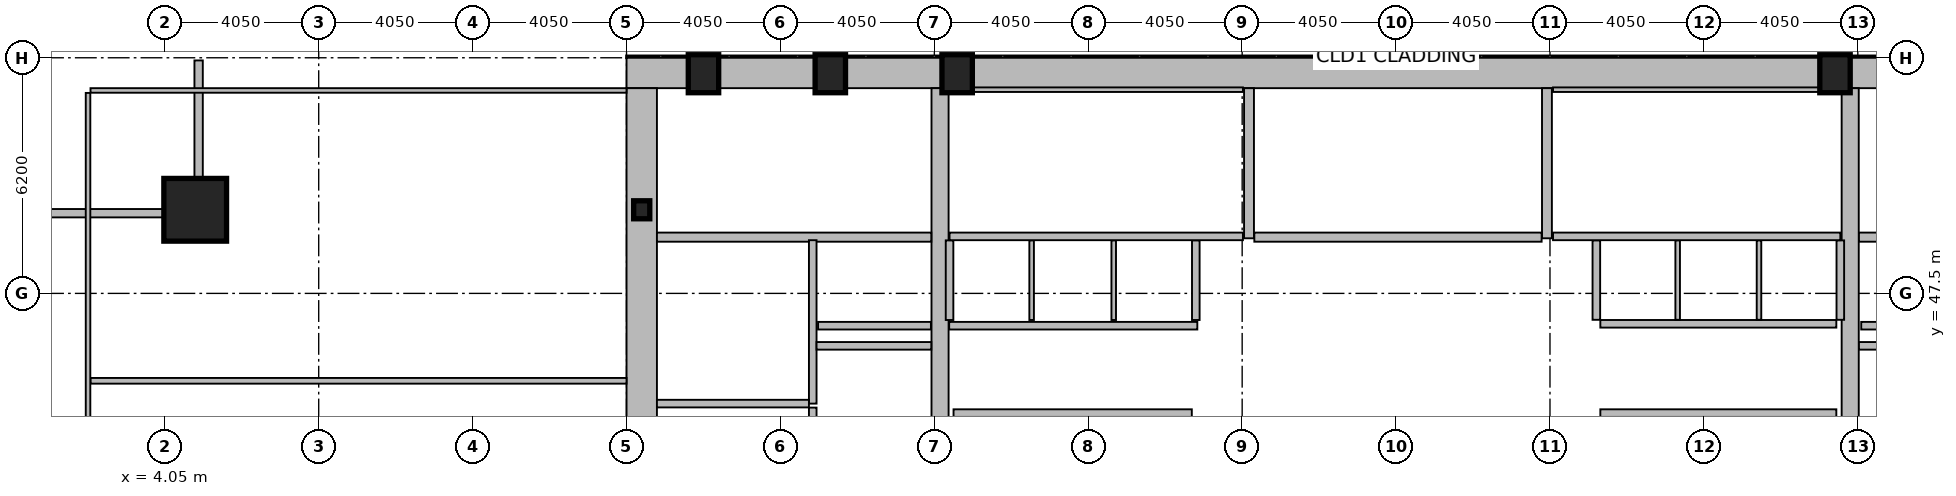
"""IFC4 building model, lengths in metres.
Left out: names, types, materials, properties, quantities, classifications, styles, units other than length and angle.
Written with IfcOpenShell. Run it as: python <this file> out.ifc"""

import sys

from ifc_helpers import new_model, si_unit, direction, frame, frame_2d, origin, origin_2d, place, context, subcontext, project, spatial, rectangle, hollow_rectangle, i_section, extrude, element, fill, save


model = new_model("IFC4")
c1 = context("Model", 3, precision=1e-05, world=origin(), true_north=direction((0.0, 1.0)))
c2 = subcontext(c1, "Body", "Model", "MODEL_VIEW")
j1 = project(units=[si_unit("LENGTHUNIT", "METRE"), si_unit("PLANEANGLEUNIT", "RADIAN")], contexts=[c1])
p1 = place(None, origin())
s1 = spatial("IfcSite", under=j1, at=p1, CompositionType="ELEMENT")
p2 = place(p1, origin())
s2 = spatial("IfcBuilding", under=s1, at=p2, CompositionType="ELEMENT")
p3 = place(p2, frame((0.0, 0.0, 61.8)))
s3 = spatial("IfcBuildingStorey", under=s2, at=p3, CompositionType="ELEMENT", Elevation=61.8)
p4 = place(p3, frame((16.2, 53.3, 0.0), z_axis=(0.0, 0.0, 1.0), x_axis=(1.0, 0.0, 0.0)))
e1 = element("IfcWall", 1, at=p4, inside=s3, PredefinedType="SHEAR", context=c2, shape_type="SweptSolid", body=[
    extrude(rectangle(XDim=40.5, YDim=0.8, at=frame_2d((20.25, 0.0))), origin(), (0.0, 0.0, 1.0), 3.82),
])
p5 = place(p3, frame((16.6, 42.1, 0.0), z_axis=(0.0, 0.0, 1.0), x_axis=(0.0, 1.0, 0.0)))
e2 = element("IfcWall", 2, at=p5, inside=s3, PredefinedType="SHEAR", context=c2, shape_type="SweptSolid", body=[
    extrude(rectangle(XDim=10.8, YDim=0.8, at=frame_2d((5.4, 0.0))), origin(), (0.0, 0.0, 1.0), 3.82),
])
for number, where, z_axis, x_axis in (
    (3, (24.45, 42.1, 0.0), (0.0, 0.0, 1.0), (0.0, 1.0, 0.0)),
    (4, (48.4, 42.1, 0.0), (0.0, 0.0, 1.0), (0.0, 1.0, 0.0)),
):
    element("IfcWall", number, at=place(p3, frame(where, z_axis=z_axis, x_axis=x_axis)), inside=s3, PredefinedType="SHEAR", context=c2, shape_type="SweptSolid", body=[
        extrude(rectangle(XDim=10.8, YDim=0.45, at=frame_2d((5.4, 0.0))), origin(), (0.0, 0.0, 1.0), 3.82),
    ])
for number, where, z_axis, x_axis in (
    (5, (32.58, 48.95, 0.0), (0.0, 0.0, 1.0), (0.0, 1.0, 0.0)),
    (6, (40.42, 48.95, 0.0), (0.0, 0.0, 1.0), (0.0, 1.0, 0.0)),
):
    element("IfcWall", number, at=place(p3, frame(where, z_axis=z_axis, x_axis=x_axis)), inside=s3, PredefinedType="SHEAR", context=c2, shape_type="SweptSolid", body=[
        extrude(rectangle(XDim=3.95, YDim=0.26, at=frame_2d((1.975, 0.0))), origin(), (0.0, 0.0, 1.0), 3.82),
    ])
p6 = place(p3, frame((17.0, 48.98, 0.0), z_axis=(0.0, 0.0, 1.0), x_axis=(1.0, 0.0, 0.0)))
e7 = element("IfcWall", 7, at=p6, inside=s3, PredefinedType="SHEAR", context=c2, shape_type="SweptSolid", body=[
    extrude(rectangle(XDim=7.22, YDim=0.24, at=frame_2d((3.61, 0.0))), origin(), (0.0, 0.0, 1.0), 3.82),
])
p7 = place(p6, frame((0.22, 0.0, 0.0)))
e8 = element("IfcOpeningElement", 8, at=p7, cuts=e7, PredefinedType="OPENING", context=c2, shape_type="SweptSolid", body=[
    extrude(rectangle(XDim=1.05, YDim=2.15, at=frame_2d((0.525, 1.075))), frame((0.0, 0.13, 0.0), z_axis=(0.0, -1.0, 0.0), x_axis=(1.0, 0.0, 0.0)), (0.0, 0.0, 1.0), 0.26),
])
p8 = place(p3, frame((48.63, 48.98, 0.0), z_axis=(0.0, 0.0, 1.0), x_axis=(1.0, 0.0, 0.0)))
e9 = element("IfcWall", 9, at=p8, inside=s3, PredefinedType="SHEAR", context=c2, shape_type="SweptSolid", body=[
    extrude(rectangle(XDim=7.27, YDim=0.24, at=frame_2d((3.635, 0.0))), origin(), (0.0, 0.0, 1.0), 3.82),
])
p9 = place(p8, frame((6.0, 0.0, 0.0)))
e10 = element("IfcOpeningElement", 10, at=p9, cuts=e9, PredefinedType="OPENING", context=c2, shape_type="SweptSolid", body=[
    extrude(rectangle(XDim=1.05, YDim=2.15, at=frame_2d((0.525, 1.075))), frame((0.0, 0.13, 0.0), z_axis=(0.0, -1.0, 0.0), x_axis=(1.0, 0.0, 0.0)), (0.0, 0.0, 1.0), 0.26),
])
p10 = place(p3, frame((32.72, 48.98, 0.0), z_axis=(0.0, 0.0, 1.0), x_axis=(1.0, 0.0, 0.0)))
e11 = element("IfcWall", 11, at=p10, inside=s3, PredefinedType="SHEAR", context=c2, shape_type="SweptSolid", body=[
    extrude(rectangle(XDim=7.56, YDim=0.24, at=frame_2d((3.78, 0.0))), origin(), (0.0, 0.0, 1.0), 3.82),
])
p11 = place(p10, frame((0.22, 0.0, 0.0)))
e12 = element("IfcOpeningElement", 12, at=p11, cuts=e11, PredefinedType="OPENING", context=c2, shape_type="SweptSolid", body=[
    extrude(rectangle(XDim=1.05, YDim=2.15, at=frame_2d((0.525, 1.075))), frame((0.0, 0.13, 0.0), z_axis=(0.0, -1.0, 0.0), x_axis=(1.0, 0.0, 0.0)), (0.0, 0.0, 1.0), 0.26),
])
p12 = place(p3, frame((4.85, 49.7, 0.0), z_axis=(0.0, 0.0, 1.0), x_axis=(1.0, 0.0, 0.0)))
e13 = element("IfcColumn", 13, at=p12, inside=s3, PredefinedType="COLUMN", context=c2, shape_type="SweptSolid", body=[
    extrude(hollow_rectangle(XDim=1.65, YDim=1.65, WallThickness=0.075, at=origin_2d()), origin(), (0.0, 0.0, 1.0), 4.0),
])
for number, where, z_axis, x_axis in (
    (14, (18.225, 53.28, 0.0), (0.0, 0.0, 1.0), (1.0, 0.0, 0.0)),
    (15, (21.562, 53.28, 0.0), (0.0, 0.0, 1.0), (1.0, 0.0, 0.0)),
    (16, (24.9, 53.28, 0.0), (0.0, 0.0, 1.0), (1.0, 0.0, 0.0)),
    (17, (48.0, 53.28, 0.0), (0.0, 0.0, 1.0), (1.0, 0.0, 0.0)),
):
    element("IfcColumn", number, at=place(p3, frame(where, z_axis=z_axis, x_axis=x_axis)), inside=s3, PredefinedType="COLUMN", context=c2, shape_type="SweptSolid", body=[
        extrude(hollow_rectangle(XDim=0.8, YDim=1.0, WallThickness=0.055, at=origin_2d()), origin(), (0.0, 0.0, 1.0), 4.0),
    ])
p13 = place(p3, frame((16.6, 49.7, 0.0), z_axis=(0.0, 0.0, 1.0), x_axis=(1.0, 0.0, 0.0)))
e18 = element("IfcColumn", 18, at=p13, inside=s3, PredefinedType="COLUMN", context=c2, shape_type="SweptSolid", body=[
    extrude(i_section(OverallWidth=0.424, OverallDepth=0.474, WebThickness=0.048, FlangeThickness=0.077, at=origin_2d()), origin(), (0.0, 0.0, 1.0), 4.0),
])
p14 = place(p3, frame((0.83, 49.61, 0.0), z_axis=(0.0, 0.0, 1.0), x_axis=(1.0, 0.0, 0.0)))
e19 = element("IfcWall", 19, at=p14, inside=s3, PredefinedType="SOLIDWALL", context=c2, shape_type="SweptSolid", body=[
    extrude(rectangle(XDim=4.22, YDim=0.22, at=frame_2d((2.11, 0.0))), origin(), (0.0, 0.0, 1.0), 3.16),
])
p15 = place(p3, frame((4.94, 49.72, 0.0), z_axis=(0.0, 0.0, 1.0), x_axis=(0.0, 1.0, 0.0)))
e20 = element("IfcWall", 20, at=p15, inside=s3, PredefinedType="SOLIDWALL", context=c2, shape_type="SweptSolid", body=[
    extrude(rectangle(XDim=3.91, YDim=0.22, at=frame_2d((1.955, 0.0))), origin(), (0.0, 0.0, 1.0), 3.16),
])
p16 = place(p3, frame((51.61, 46.65, 0.0), z_axis=(0.0, 0.0, 1.0), x_axis=(-1.0, 0.0, 0.0)))
e21 = element("IfcWall", 21, at=p16, inside=s3, PredefinedType="PARTITIONING", context=c2, shape_type="SweptSolid", body=[
    extrude(rectangle(XDim=2.92, YDim=0.2, at=frame_2d((1.46, 0.0))), origin(), (0.0, 0.0, 1.0), 3.82),
])
p17 = place(p16, frame((0.86, 0.0, 0.0)))
e22 = element("IfcOpeningElement", 22, at=p17, cuts=e21, PredefinedType="OPENING", context=c2, shape_type="SweptSolid", body=[
    extrude(rectangle(XDim=1.2, YDim=2.18, at=frame_2d((0.6, 1.09))), frame((0.0, 0.11, 0.0), z_axis=(0.0, -1.0, 0.0), x_axis=(1.0, 0.0, 0.0)), (0.0, 0.0, 1.0), 0.22),
])
p18 = place(p3, frame((24.21, 46.65, 0.0), z_axis=(0.0, 0.0, 1.0), x_axis=(-1.0, 0.0, 0.0)))
e23 = element("IfcWall", 23, at=p18, inside=s3, PredefinedType="PARTITIONING", context=c2, shape_type="SweptSolid", body=[
    extrude(rectangle(XDim=2.97, YDim=0.2, at=frame_2d((1.485, 0.0))), origin(), (0.0, 0.0, 1.0), 3.82),
])
p19 = place(p18, frame((0.91, 0.0, 0.0)))
e24 = element("IfcOpeningElement", 24, at=p19, cuts=e23, PredefinedType="OPENING", context=c2, shape_type="SweptSolid", body=[
    extrude(rectangle(XDim=1.2, YDim=2.18, at=frame_2d((0.6, 1.09))), frame((0.0, 0.11, 0.0), z_axis=(0.0, -1.0, 0.0), x_axis=(1.0, 0.0, 0.0)), (0.0, 0.0, 1.0), 0.22),
])
p20 = place(p3, frame((31.22, 46.65, 0.0), z_axis=(0.0, 0.0, 1.0), x_axis=(-1.0, 0.0, 0.0)))
e25 = element("IfcWall", 25, at=p20, inside=s3, PredefinedType="PARTITIONING", context=c2, shape_type="SweptSolid", body=[
    extrude(rectangle(XDim=6.53, YDim=0.2, at=frame_2d((3.265, 0.0))), origin(), (0.0, 0.0, 1.0), 3.82),
])
p21 = place(p20, frame((4.9, 0.0, 0.0)))
e26 = element("IfcOpeningElement", 26, at=p21, cuts=e25, PredefinedType="OPENING", context=c2, shape_type="SweptSolid", body=[
    extrude(rectangle(XDim=1.1, YDim=2.18, at=frame_2d((0.55, 1.09))), frame((0.0, 0.11, 0.0), z_axis=(0.0, -1.0, 0.0), x_axis=(1.0, 0.0, 0.0)), (0.0, 0.0, 1.0), 0.22),
])
p22 = place(p20, frame((2.74, 0.0, 0.0)))
e27 = element("IfcOpeningElement", 27, at=p22, cuts=e25, PredefinedType="OPENING", context=c2, shape_type="SweptSolid", body=[
    extrude(rectangle(XDim=1.1, YDim=2.18, at=frame_2d((0.55, 1.09))), frame((0.0, 0.11, 0.0), z_axis=(0.0, -1.0, 0.0), x_axis=(1.0, 0.0, 0.0)), (0.0, 0.0, 1.0), 0.22),
])
p23 = place(p20, frame((0.58, 0.0, 0.0)))
e28 = element("IfcOpeningElement", 28, at=p23, cuts=e25, PredefinedType="OPENING", context=c2, shape_type="SweptSolid", body=[
    extrude(rectangle(XDim=1.1, YDim=2.18, at=frame_2d((0.55, 1.09))), frame((0.0, 0.11, 0.0), z_axis=(0.0, -1.0, 0.0), x_axis=(1.0, 0.0, 0.0)), (0.0, 0.0, 1.0), 0.22),
])
p24 = place(p3, frame((21.1, 44.6, 0.0), z_axis=(0.0, 0.0, 1.0), x_axis=(0.0, 1.0, 0.0)))
e29 = element("IfcWall", 29, at=p24, inside=s3, PredefinedType="PARTITIONING", context=c2, shape_type="SweptSolid", body=[
    extrude(rectangle(XDim=4.3, YDim=0.2, at=frame_2d((2.15, 0.0))), origin(), (0.0, 0.0, 1.0), 3.82),
])
p25 = place(p3, frame((17.0, 44.6, 0.0), z_axis=(0.0, 0.0, 1.0), x_axis=(1.0, 0.0, 0.0)))
e30 = element("IfcWall", 30, at=p25, inside=s3, PredefinedType="PARTITIONING", context=c2, shape_type="SweptSolid", body=[
    extrude(rectangle(XDim=4.0, YDim=0.2, at=frame_2d((2.0, 0.0))), origin(), (0.0, 0.0, 1.0), 3.82),
])
p26 = place(p25, frame((1.25, 0.0, 0.0)))
e31 = element("IfcOpeningElement", 31, at=p26, cuts=e30, PredefinedType="OPENING", context=c2, shape_type="SweptSolid", body=[
    extrude(rectangle(XDim=1.05, YDim=2.15, at=frame_2d((0.525, 1.075))), frame((0.0, 0.11, 0.0), z_axis=(0.0, -1.0, 0.0), x_axis=(1.0, 0.0, 0.0)), (0.0, 0.0, 1.0), 0.22),
])
p27 = place(p3, frame((21.2, 46.12, 0.0), z_axis=(0.0, 0.0, 1.0), x_axis=(1.0, 0.0, 0.0)))
e32 = element("IfcWall", 32, at=p27, inside=s3, PredefinedType="PARTITIONING", context=c2, shape_type="SweptSolid", body=[
    extrude(rectangle(XDim=3.02, YDim=0.2, at=frame_2d((1.51, 0.0))), origin(), (0.0, 0.0, 1.0), 3.82),
])
p28 = place(p3, frame((21.1, 42.1, 0.0), z_axis=(0.0, 0.0, 1.0), x_axis=(0.0, 1.0, 0.0)))
e33 = element("IfcWall", 33, at=p28, inside=s3, PredefinedType="PARTITIONING", context=c2, shape_type="SweptSolid", body=[
    extrude(rectangle(XDim=2.395, YDim=0.2, at=frame_2d((1.198, 0.0))), origin(), (0.0, 0.0, 1.0), 3.82),
])
p29 = place(p28, frame((0.38, 0.0, 0.0)))
e34 = element("IfcOpeningElement", 34, at=p29, cuts=e33, PredefinedType="OPENING", context=c2, shape_type="SweptSolid", body=[
    extrude(rectangle(XDim=1.05, YDim=2.15, at=frame_2d((0.525, 1.075))), frame((0.0, 0.11, 0.0), z_axis=(0.0, -1.0, 0.0), x_axis=(1.0, 0.0, 0.0)), (0.0, 0.0, 1.0), 0.22),
])
p30 = place(p3, frame((48.63, 46.12, 0.0), z_axis=(0.0, 0.0, 1.0), x_axis=(1.0, 0.0, 0.0)))
e35 = element("IfcWall", 35, at=p30, inside=s3, PredefinedType="PARTITIONING", context=c2, shape_type="SweptSolid", body=[
    extrude(rectangle(XDim=3.07, YDim=0.2, at=frame_2d((1.535, 0.0))), origin(), (0.0, 0.0, 1.0), 3.82),
])
for number, where, z_axis, x_axis in (
    (36, (24.7, 46.8, 0.0), (0.0, 0.0, 1.0), (0.0, 1.0, 0.0)),
    (37, (31.18, 46.8, 0.0), (0.0, 0.0, 1.0), (0.0, 1.0, 0.0)),
):
    element("IfcWall", number, at=place(p3, frame(where, z_axis=z_axis, x_axis=x_axis)), inside=s3, PredefinedType="PARTITIONING", context=c2, shape_type="SweptSolid", body=[
        extrude(rectangle(XDim=2.095, YDim=0.2, at=frame_2d((1.047, 0.0))), origin(), (0.0, 0.0, 1.0), 3.82),
    ])
for number, where, z_axis, x_axis in (
    (38, (26.86, 46.8, 0.0), (0.0, 0.0, 1.0), (0.0, 1.0, 0.0)),
    (39, (29.02, 46.8, 0.0), (0.0, 0.0, 1.0), (0.0, 1.0, 0.0)),
):
    element("IfcWall", number, at=place(p3, frame(where, z_axis=z_axis, x_axis=x_axis)), inside=s3, PredefinedType="PARTITIONING", context=c2, shape_type="SweptSolid", body=[
        extrude(rectangle(XDim=2.095, YDim=0.12, at=frame_2d((1.047, 0.0))), origin(), (0.0, 0.0, 1.0), 3.82),
    ])
p31 = place(p3, frame((24.805, 44.35, 0.0), z_axis=(0.0, 0.0, 1.0), x_axis=(1.0, 0.0, 0.0)))
e40 = element("IfcWall", 40, at=p31, inside=s3, PredefinedType="PARTITIONING", context=c2, shape_type="SweptSolid", body=[
    extrude(rectangle(XDim=6.27, YDim=0.2, at=frame_2d((3.135, 0.0))), origin(), (0.0, 0.0, 1.0), 3.82),
])
p32 = place(p3, frame((41.825, 46.7, 0.0), z_axis=(0.0, 0.0, 1.0), x_axis=(1.0, 0.0, 0.0)))
e41 = element("IfcWall", 41, at=p32, inside=s3, PredefinedType="PARTITIONING", context=c2, shape_type="SweptSolid", body=[
    extrude(rectangle(XDim=6.21, YDim=0.2, at=frame_2d((3.105, 0.0))), origin(), (0.0, 0.0, 1.0), 3.82),
])
for number, where, z_axis, x_axis in (
    (42, (41.72, 46.805, 0.0), (0.0, 0.0, 1.0), (0.0, 1.0, 0.0)),
    (43, (48.14, 46.805, 0.0), (0.0, 0.0, 1.0), (0.0, 1.0, 0.0)),
):
    element("IfcWall", number, at=place(p3, frame(where, z_axis=z_axis, x_axis=x_axis)), inside=s3, PredefinedType="PARTITIONING", context=c2, shape_type="SweptSolid", body=[
        extrude(rectangle(XDim=2.09, YDim=0.2, at=frame_2d((1.045, 0.0))), origin(), (0.0, 0.0, 1.0), 3.82),
    ])
for number, where, z_axis, x_axis in (
    (44, (43.86, 46.805, 0.0), (0.0, 0.0, 1.0), (0.0, 1.0, 0.0)),
    (45, (46.0, 46.805, 0.0), (0.0, 0.0, 1.0), (0.0, 1.0, 0.0)),
):
    element("IfcWall", number, at=place(p3, frame(where, z_axis=z_axis, x_axis=x_axis)), inside=s3, PredefinedType="PARTITIONING", context=c2, shape_type="SweptSolid", body=[
        extrude(rectangle(XDim=2.09, YDim=0.12, at=frame_2d((1.045, 0.0))), origin(), (0.0, 0.0, 1.0), 3.82),
    ])
p33 = place(p3, frame((41.825, 44.35, 0.0), z_axis=(0.0, 0.0, 1.0), x_axis=(1.0, 0.0, 0.0)))
e46 = element("IfcWall", 46, at=p33, inside=s3, PredefinedType="PARTITIONING", context=c2, shape_type="SweptSolid", body=[
    extrude(rectangle(XDim=6.21, YDim=0.2, at=frame_2d((3.105, 0.0))), origin(), (0.0, 0.0, 1.0), 3.82),
])
p34 = place(p3, frame((24.7, 52.86, 0.0), z_axis=(0.0, 0.0, 1.0), x_axis=(1.0, 0.0, 0.0)))
e47 = element("IfcWall", 47, at=p34, inside=s3, PredefinedType="PARTITIONING", context=c2, shape_type="SweptSolid", body=[
    extrude(rectangle(XDim=7.72, YDim=0.12, at=frame_2d((3.86, 0.0))), origin(), (0.0, 0.0, 1.0), 3.82),
])
p35 = place(p3, frame((24.7, 49.0, 0.0), z_axis=(0.0, 0.0, 1.0), x_axis=(1.0, 0.0, 0.0)))
e48 = element("IfcWall", 48, at=p35, inside=s3, PredefinedType="PARTITIONING", context=c2, shape_type="SweptSolid", body=[
    extrude(rectangle(XDim=7.72, YDim=0.2, at=frame_2d((3.86, 0.0))), origin(), (0.0, 0.0, 1.0), 3.82),
])
p36 = place(p35, frame((6.56, 0.0, 0.0)))
e49 = element("IfcOpeningElement", 49, at=p36, cuts=e48, PredefinedType="OPENING", context=c2, shape_type="SweptSolid", body=[
    extrude(rectangle(XDim=0.95, YDim=2.1, at=frame_2d((0.475, 1.05))), frame((0.0, 0.11, 0.0), z_axis=(0.0, -1.0, 0.0), x_axis=(1.0, 0.0, 0.0)), (0.0, 0.0, 1.0), 0.22),
])
p37 = place(p3, frame((40.58, 52.86, 0.0), z_axis=(0.0, 0.0, 1.0), x_axis=(1.0, 0.0, 0.0)))
e50 = element("IfcWall", 50, at=p37, inside=s3, PredefinedType="PARTITIONING", context=c2, shape_type="SweptSolid", body=[
    extrude(rectangle(XDim=7.56, YDim=0.12, at=frame_2d((3.78, 0.0))), origin(), (0.0, 0.0, 1.0), 3.82),
])
p38 = place(p3, frame((40.58, 49.0, 0.0), z_axis=(0.0, 0.0, 1.0), x_axis=(1.0, 0.0, 0.0)))
e51 = element("IfcWall", 51, at=p38, inside=s3, PredefinedType="PARTITIONING", context=c2, shape_type="SweptSolid", body=[
    extrude(rectangle(XDim=7.56, YDim=0.2, at=frame_2d((3.78, 0.0))), origin(), (0.0, 0.0, 1.0), 3.82),
])
p39 = place(p38, frame((0.16, 0.0, 0.0)))
e52 = element("IfcOpeningElement", 52, at=p39, cuts=e51, PredefinedType="OPENING", context=c2, shape_type="SweptSolid", body=[
    extrude(rectangle(XDim=0.95, YDim=2.1, at=frame_2d((0.475, 1.05))), frame((0.0, 0.11, 0.0), z_axis=(0.0, -1.0, 0.0), x_axis=(1.0, 0.0, 0.0)), (0.0, 0.0, 1.0), 0.22),
])
p40 = place(p3, frame((2.095, 45.2, 0.0), z_axis=(0.0, 0.0, 1.0), x_axis=(1.0, 0.0, 0.0)))
e53 = element("IfcWall", 53, at=p40, inside=s3, PredefinedType="PARTITIONING", context=c2, shape_type="SweptSolid", body=[
    extrude(rectangle(XDim=14.105, YDim=0.15, at=frame_2d((7.052, 0.0))), origin(), (0.0, 0.0, 1.0), 3.16),
])
p41 = place(p40, frame((12.32, 0.0, 0.0)))
e54 = element("IfcOpeningElement", 54, at=p41, cuts=e53, PredefinedType="OPENING", context=c2, shape_type="SweptSolid", body=[
    extrude(rectangle(XDim=0.9, YDim=2.05, at=frame_2d((0.45, 1.025))), frame((0.0, 0.085, 0.0), z_axis=(0.0, -1.0, 0.0), x_axis=(1.0, 0.0, 0.0)), (0.0, 0.0, 1.0), 0.17),
])
p42 = place(p3, frame((2.03, 10.665, 0.0), z_axis=(0.0, 0.0, 1.0), x_axis=(0.0, 1.0, 0.0)))
e55 = element("IfcWall", 55, at=p42, inside=s3, PredefinedType="PARTITIONING", context=c2, shape_type="SweptSolid", body=[
    extrude(rectangle(XDim=42.11, YDim=0.12, at=frame_2d((21.055, 0.0))), origin(), (0.0, 0.0, 1.0), 3.01),
])
p43 = place(p3, frame((2.095, 52.84, 0.0), z_axis=(0.0, 0.0, 1.0), x_axis=(1.0, 0.0, 0.0)))
e56 = element("IfcWall", 56, at=p43, inside=s3, PredefinedType="PARTITIONING", context=c2, shape_type="SweptSolid", body=[
    extrude(rectangle(XDim=14.105, YDim=0.12, at=frame_2d((7.052, 0.0))), origin(), (0.0, 0.0, 1.0), 3.82),
])
p44 = place(p7, origin())
e57 = element("IfcDoor", 57, at=p44, inside=s3, OperationType="SINGLE_SWING_LEFT", PredefinedType="DOOR", context=c2, shape_type="SweptSolid", body=[
    extrude(rectangle(XDim=1.05, YDim=2.15, at=frame_2d((0.525, 1.075))), frame((0.0, 0.025, 0.0), z_axis=(0.0, -1.0, 0.0), x_axis=(1.0, 0.0, 0.0)), (0.0, 0.0, 1.0), 0.05),
])
fill(e8, e57)
p45 = place(p11, origin())
e58 = element("IfcDoor", 58, at=p45, inside=s3, OperationType="SINGLE_SWING_LEFT", PredefinedType="DOOR", context=c2, shape_type="SweptSolid", body=[
    extrude(rectangle(XDim=1.05, YDim=2.15, at=frame_2d((0.525, 1.075))), frame((0.0, 0.025, 0.0), z_axis=(0.0, -1.0, 0.0), x_axis=(1.0, 0.0, 0.0)), (0.0, 0.0, 1.0), 0.05),
])
fill(e12, e58)
p46 = place(p19, origin())
e59 = element("IfcDoor", 59, at=p46, inside=s3, OperationType="SLIDING_TO_LEFT", PredefinedType="DOOR", context=c2, shape_type="SweptSolid", body=[
    extrude(rectangle(XDim=1.2, YDim=2.18, at=frame_2d((0.6, 1.09))), frame((0.0, 0.025, 0.0), z_axis=(0.0, -1.0, 0.0), x_axis=(1.0, 0.0, 0.0)), (0.0, 0.0, 1.0), 0.05),
])
fill(e24, e59)
p47 = place(p21, origin())
e60 = element("IfcDoor", 60, at=p47, inside=s3, OperationType="SLIDING_TO_LEFT", PredefinedType="DOOR", context=c2, shape_type="SweptSolid", body=[
    extrude(rectangle(XDim=1.1, YDim=2.18, at=frame_2d((0.55, 1.09))), frame((0.0, 0.025, 0.0), z_axis=(0.0, -1.0, 0.0), x_axis=(1.0, 0.0, 0.0)), (0.0, 0.0, 1.0), 0.05),
])
fill(e26, e60)
p48 = place(p22, origin())
e61 = element("IfcDoor", 61, at=p48, inside=s3, OperationType="SLIDING_TO_LEFT", PredefinedType="DOOR", context=c2, shape_type="SweptSolid", body=[
    extrude(rectangle(XDim=1.1, YDim=2.18, at=frame_2d((0.55, 1.09))), frame((0.0, 0.025, 0.0), z_axis=(0.0, -1.0, 0.0), x_axis=(1.0, 0.0, 0.0)), (0.0, 0.0, 1.0), 0.05),
])
fill(e27, e61)
p49 = place(p23, origin())
e62 = element("IfcDoor", 62, at=p49, inside=s3, OperationType="SLIDING_TO_LEFT", PredefinedType="DOOR", context=c2, shape_type="SweptSolid", body=[
    extrude(rectangle(XDim=1.1, YDim=2.18, at=frame_2d((0.55, 1.09))), frame((0.0, 0.025, 0.0), z_axis=(0.0, -1.0, 0.0), x_axis=(1.0, 0.0, 0.0)), (0.0, 0.0, 1.0), 0.05),
])
fill(e28, e62)
p50 = place(p26, origin())
e63 = element("IfcDoor", 63, at=p50, inside=s3, OperationType="SINGLE_SWING_RIGHT", PredefinedType="DOOR", context=c2, shape_type="SweptSolid", body=[
    extrude(rectangle(XDim=1.05, YDim=2.15, at=frame_2d((0.525, 1.075))), frame((0.0, 0.025, 0.0), z_axis=(0.0, -1.0, 0.0), x_axis=(1.0, 0.0, 0.0)), (0.0, 0.0, 1.0), 0.05),
])
fill(e31, e63)
p51 = place(p36, origin())
e64 = element("IfcDoor", 64, at=p51, inside=s3, OperationType="SINGLE_SWING_RIGHT", PredefinedType="DOOR", context=c2, shape_type="SweptSolid", body=[
    extrude(rectangle(XDim=0.95, YDim=2.1, at=frame_2d((0.475, 1.05))), frame((0.0, 0.025, 0.0), z_axis=(0.0, -1.0, 0.0), x_axis=(1.0, 0.0, 0.0)), (0.0, 0.0, 1.0), 0.05),
])
fill(e49, e64)
p52 = place(p39, origin())
e65 = element("IfcDoor", 65, at=p52, inside=s3, OperationType="SINGLE_SWING_LEFT", PredefinedType="DOOR", context=c2, shape_type="SweptSolid", body=[
    extrude(rectangle(XDim=0.95, YDim=2.1, at=frame_2d((0.475, 1.05))), frame((0.0, 0.025, 0.0), z_axis=(0.0, -1.0, 0.0), x_axis=(1.0, 0.0, 0.0)), (0.0, 0.0, 1.0), 0.05),
])
fill(e52, e65)
p53 = place(p41, origin())
e66 = element("IfcDoor", 66, at=p53, inside=s3, OperationType="SINGLE_SWING_LEFT", PredefinedType="DOOR", context=c2, shape_type="SweptSolid", body=[
    extrude(rectangle(XDim=0.9, YDim=2.05, at=frame_2d((0.45, 1.025))), frame((0.0, 0.025, 0.0), z_axis=(0.0, -1.0, 0.0), x_axis=(1.0, 0.0, 0.0)), (0.0, 0.0, 1.0), 0.05),
])
fill(e54, e66)
save(model, sys.argv[1])
